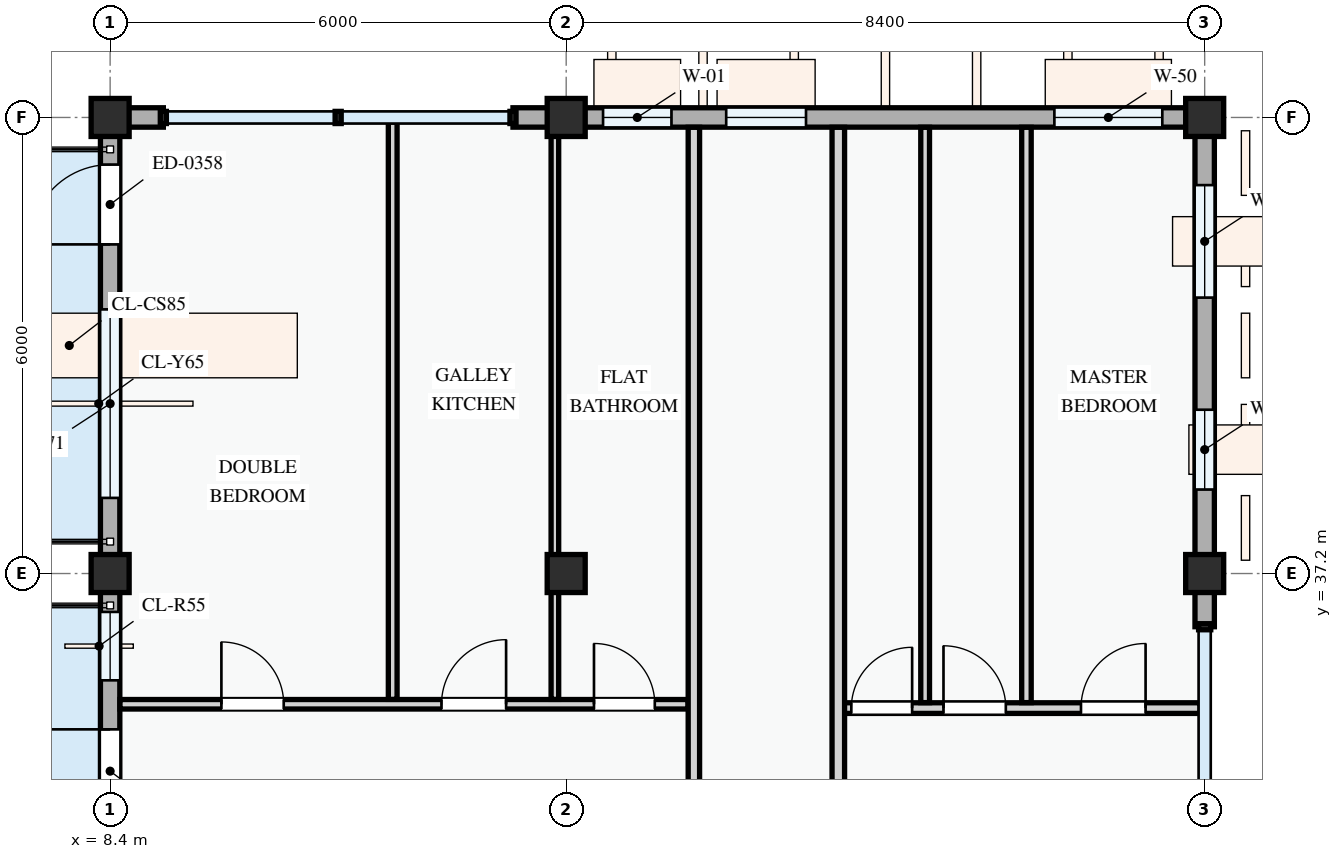
"""IFC4 building model, lengths in metres.
Left out: names, types, materials, properties, quantities, classifications, styles, units other than length and angle.
Written with IfcOpenShell. Run it as: python <this file> out.ifc"""

import sys

from ifc_helpers import new_model, si_unit, direction, frame, frame_2d, origin, origin_2d, place, context, subcontext, project, spatial, rectangle, extrude, element, fill, save


model = new_model("IFC4")
c1 = context("Model", 3, precision=1e-05, world=origin(), true_north=direction((0.0, 1.0)))
c2 = subcontext(c1, "Body", "Model", "MODEL_VIEW")
j1 = project(units=[si_unit("LENGTHUNIT", "METRE"), si_unit("PLANEANGLEUNIT", "RADIAN")], contexts=[c1])
p1 = place(None, origin())
s1 = spatial("IfcSite", under=j1, at=p1, CompositionType="ELEMENT")
p2 = place(p1, origin())
s2 = spatial("IfcBuilding", under=s1, at=p2, CompositionType="ELEMENT")
p3 = place(p2, frame((0.0, 0.0, 31.2)))
s3 = spatial("IfcBuildingStorey", under=s2, at=p3, CompositionType="ELEMENT", Elevation=31.2)
for number, where, z_axis, x_axis in (
    (1, (8.4, 37.2, 0.0), (0.0, 0.0, 1.0), (1.0, 0.0, 0.0)),
    (2, (8.4, 43.2, 0.0), (0.0, 0.0, 1.0), (1.0, 0.0, 0.0)),
    (3, (14.4, 37.2, 0.0), (0.0, 0.0, 1.0), (1.0, 0.0, 0.0)),
    (4, (14.4, 43.2, 0.0), (0.0, 0.0, 1.0), (1.0, 0.0, 0.0)),
    (5, (22.8, 37.2, 0.0), (0.0, 0.0, 1.0), (1.0, 0.0, 0.0)),
    (6, (22.8, 43.2, 0.0), (0.0, 0.0, 1.0), (1.0, 0.0, 0.0)),
):
    element("IfcColumn", number, at=place(p3, frame(where, z_axis=z_axis, x_axis=x_axis)), inside=s3, PredefinedType="COLUMN", context=c2, shape_type="SweptSolid", body=[
        extrude(rectangle(XDim=0.5, YDim=0.5, at=origin_2d()), origin(), (0.0, 0.0, 1.0), 3.3),
    ])
p4 = place(p3, frame((22.8, 36.5, 0.0), z_axis=(0.0, 0.0, 1.0), x_axis=(0.0, 1.0, 0.0)))
e7 = element("IfcWall", 7, at=p4, inside=s3, PredefinedType="STANDARD", context=c2, shape_type="SweptSolid", body=[
    extrude(rectangle(XDim=0.7, YDim=0.255, at=frame_2d((0.35, 0.0))), origin(), (0.0, 0.0, 1.0), 2.425),
])
p5 = place(p3, frame((22.8, 37.2, 0.0), z_axis=(0.0, 0.0, 1.0), x_axis=(0.0, 1.0, 0.0)))
e8 = element("IfcWall", 8, at=p5, inside=s3, PredefinedType="STANDARD", context=c2, shape_type="SweptSolid", body=[
    extrude(rectangle(XDim=6.0, YDim=0.255, at=frame_2d((3.0, 0.0))), origin(), (0.0, 0.0, 1.0), 2.575),
])
p6 = place(p5, frame((1.105, 0.0, 0.78)))
e9 = element("IfcOpeningElement", 9, at=p6, cuts=e8, PredefinedType="OPENING", context=c2, shape_type="SweptSolid", body=[
    extrude(rectangle(XDim=1.05, YDim=1.2, at=frame_2d((0.525, 0.6))), frame((0.0, 0.137, 0.0), z_axis=(0.0, -1.0, 0.0), x_axis=(1.0, 0.0, 0.0)), (0.0, 0.0, 1.0), 0.275),
])
p7 = place(p5, frame((3.63, 0.0, 0.78)))
e10 = element("IfcOpeningElement", 10, at=p7, cuts=e8, PredefinedType="OPENING", context=c2, shape_type="SweptSolid", body=[
    extrude(rectangle(XDim=1.48, YDim=1.52, at=frame_2d((0.74, 0.76))), frame((0.0, 0.137, 0.0), z_axis=(0.0, -1.0, 0.0), x_axis=(1.0, 0.0, 0.0)), (0.0, 0.0, 1.0), 0.275),
])
p8 = place(p3, frame((22.8, 43.2, 0.0), z_axis=(0.0, 0.0, 1.0), x_axis=(-1.0, 0.0, 0.0)))
e11 = element("IfcWall", 11, at=p8, inside=s3, PredefinedType="STANDARD", context=c2, shape_type="SweptSolid", body=[
    extrude(rectangle(XDim=8.4, YDim=0.255, at=frame_2d((4.2, 0.0))), origin(), (0.0, 0.0, 1.0), 2.375),
])
p9 = place(p8, frame((0.557, 0.0, 0.78)))
e12 = element("IfcOpeningElement", 12, at=p9, cuts=e11, PredefinedType="OPENING", context=c2, shape_type="SweptSolid", body=[
    extrude(rectangle(XDim=1.42, YDim=1.38, at=frame_2d((0.71, 0.69))), frame((0.0, 0.137, 0.0), z_axis=(0.0, -1.0, 0.0), x_axis=(1.0, 0.0, 0.0)), (0.0, 0.0, 1.0), 0.275),
])
p10 = place(p8, frame((5.245, 0.0, 0.78)))
e13 = element("IfcOpeningElement", 13, at=p10, cuts=e11, PredefinedType="OPENING", context=c2, shape_type="SweptSolid", body=[
    extrude(rectangle(XDim=1.05, YDim=1.2, at=frame_2d((0.525, 0.6))), frame((0.0, 0.137, 0.0), z_axis=(0.0, -1.0, 0.0), x_axis=(1.0, 0.0, 0.0)), (0.0, 0.0, 1.0), 0.275),
])
p11 = place(p8, frame((7.015, 0.0, 0.78)))
e14 = element("IfcOpeningElement", 14, at=p11, cuts=e11, PredefinedType="OPENING", context=c2, shape_type="SweptSolid", body=[
    extrude(rectangle(XDim=0.9, YDim=1.2, at=frame_2d((0.45, 0.6))), frame((0.0, 0.137, 0.0), z_axis=(0.0, -1.0, 0.0), x_axis=(1.0, 0.0, 0.0)), (0.0, 0.0, 1.0), 0.275),
])
p12 = place(p3, frame((14.4, 43.2, 0.0), z_axis=(0.0, 0.0, 1.0), x_axis=(-1.0, 0.0, 0.0)))
e15 = element("IfcWall", 15, at=p12, inside=s3, PredefinedType="STANDARD", context=c2, shape_type="SweptSolid", body=[
    extrude(rectangle(XDim=0.7, YDim=0.255, at=frame_2d((0.35, 0.0))), origin(), (0.0, 0.0, 1.0), 2.525),
])
p13 = place(p3, frame((9.1, 43.2, 0.0), z_axis=(0.0, 0.0, 1.0), x_axis=(-1.0, 0.0, 0.0)))
e16 = element("IfcWall", 16, at=p13, inside=s3, PredefinedType="STANDARD", context=c2, shape_type="SweptSolid", body=[
    extrude(rectangle(XDim=0.571, YDim=0.255, at=frame_2d((0.285, 0.0))), origin(), (0.0, 0.0, 1.0), 2.525),
])
p14 = place(p3, frame((8.4, 43.2, 0.0), z_axis=(0.0, 0.0, 1.0), x_axis=(0.0, -1.0, 0.0)))
e17 = element("IfcWall", 17, at=p14, inside=s3, PredefinedType="STANDARD", context=c2, shape_type="SweptSolid", body=[
    extrude(rectangle(XDim=6.0, YDim=0.255, at=frame_2d((3.0, 0.0))), origin(), (0.0, 0.0, 1.0), 2.575),
])
p15 = place(p14, frame((0.62, 0.0, 0.0)))
e18 = element("IfcOpeningElement", 18, at=p15, cuts=e17, PredefinedType="OPENING", context=c2, shape_type="SweptSolid", body=[
    extrude(rectangle(XDim=1.05, YDim=2.15, at=frame_2d((0.525, 1.075))), frame((0.0, 0.137, 0.0), z_axis=(0.0, -1.0, 0.0), x_axis=(1.0, 0.0, 0.0)), (0.0, 0.0, 1.0), 0.275),
])
p16 = place(p14, frame((2.525, 0.0, 0.78)))
e19 = element("IfcOpeningElement", 19, at=p16, cuts=e17, PredefinedType="OPENING", context=c2, shape_type="SweptSolid", body=[
    extrude(rectangle(XDim=2.48, YDim=1.46, at=frame_2d((1.24, 0.73))), frame((0.0, 0.137, 0.0), z_axis=(0.0, -1.0, 0.0), x_axis=(1.0, 0.0, 0.0)), (0.0, 0.0, 1.0), 0.275),
])
p17 = place(p3, frame((8.4, 37.2, 0.0), z_axis=(0.0, 0.0, 1.0), x_axis=(0.0, -1.0, 0.0)))
e20 = element("IfcWall", 20, at=p17, inside=s3, PredefinedType="STANDARD", context=c2, shape_type="SweptSolid", body=[
    extrude(rectangle(XDim=8.4, YDim=0.255, at=frame_2d((4.2, 0.0))), origin(), (0.0, 0.0, 1.0), 2.425),
])
p18 = place(p17, frame((2.05, 0.0, 0.0)))
e21 = element("IfcOpeningElement", 21, at=p18, cuts=e20, PredefinedType="OPENING", context=c2, shape_type="SweptSolid", body=[
    extrude(rectangle(XDim=1.1, YDim=2.15, at=frame_2d((0.55, 1.075))), frame((0.0, 0.137, 0.0), z_axis=(0.0, -1.0, 0.0), x_axis=(1.0, 0.0, 0.0)), (0.0, 0.0, 1.0), 0.275),
])
p19 = place(p17, frame((0.505, 0.0, 0.78)))
e22 = element("IfcOpeningElement", 22, at=p19, cuts=e20, PredefinedType="OPENING", context=c2, shape_type="SweptSolid", body=[
    extrude(rectangle(XDim=0.9, YDim=1.2, at=frame_2d((0.45, 0.6))), frame((0.0, 0.137, 0.0), z_axis=(0.0, -1.0, 0.0), x_axis=(1.0, 0.0, 0.0)), (0.0, 0.0, 1.0), 0.275),
])
p20 = place(p17, frame((3.63, 0.0, 0.78)))
e23 = element("IfcOpeningElement", 23, at=p20, cuts=e20, PredefinedType="OPENING", context=c2, shape_type="SweptSolid", body=[
    extrude(rectangle(XDim=2.52, YDim=1.5, at=frame_2d((1.26, 0.75))), frame((0.0, 0.137, 0.0), z_axis=(0.0, -1.0, 0.0), x_axis=(1.0, 0.0, 0.0)), (0.0, 0.0, 1.0), 0.275),
])
p21 = place(p17, frame((6.945, 0.0, 0.78)))
e24 = element("IfcOpeningElement", 24, at=p21, cuts=e20, PredefinedType="OPENING", context=c2, shape_type="SweptSolid", body=[
    extrude(rectangle(XDim=0.9, YDim=1.2, at=frame_2d((0.45, 0.6))), frame((0.0, 0.137, 0.0), z_axis=(0.0, -1.0, 0.0), x_axis=(1.0, 0.0, 0.0)), (0.0, 0.0, 1.0), 0.275),
])
p22 = place(p3, frame((8.53, 35.48, 0.0), z_axis=(0.0, 0.0, 1.0), x_axis=(1.0, 0.0, 0.0)))
e25 = element("IfcWall", 25, at=p22, inside=s3, PredefinedType="PARTITIONING", context=c2, shape_type="SweptSolid", body=[
    extrude(rectangle(XDim=7.473, YDim=0.125, at=frame_2d((3.737, 0.0))), origin(), (0.0, 0.0, 1.0), 3.0),
])
p23 = place(p22, frame((1.334, 0.0, 0.0)))
e26 = element("IfcOpeningElement", 26, at=p23, cuts=e25, PredefinedType="OPENING", context=c2, shape_type="SweptSolid", body=[
    extrude(rectangle(XDim=0.82, YDim=2.08, at=frame_2d((0.41, 1.04))), frame((0.0, 0.073, 0.0), z_axis=(0.0, -1.0, 0.0), x_axis=(1.0, 0.0, 0.0)), (0.0, 0.0, 1.0), 0.145),
])
p24 = place(p22, frame((4.23, 0.0, 0.0)))
e27 = element("IfcOpeningElement", 27, at=p24, cuts=e25, PredefinedType="OPENING", context=c2, shape_type="SweptSolid", body=[
    extrude(rectangle(XDim=0.85, YDim=2.1, at=frame_2d((0.425, 1.05))), frame((0.0, 0.073, 0.0), z_axis=(0.0, -1.0, 0.0), x_axis=(1.0, 0.0, 0.0)), (0.0, 0.0, 1.0), 0.145),
])
p25 = place(p22, frame((6.236, 0.0, 0.0)))
e28 = element("IfcOpeningElement", 28, at=p25, cuts=e25, PredefinedType="OPENING", context=c2, shape_type="SweptSolid", body=[
    extrude(rectangle(XDim=0.8, YDim=2.1, at=frame_2d((0.4, 1.05))), frame((0.0, 0.073, 0.0), z_axis=(0.0, -1.0, 0.0), x_axis=(1.0, 0.0, 0.0)), (0.0, 0.0, 1.0), 0.145),
])
p26 = place(p3, frame((12.118, 35.544, 0.0), z_axis=(0.0, 0.0, 1.0), x_axis=(0.0, 1.0, 0.0)))
e29 = element("IfcWall", 29, at=p26, inside=s3, PredefinedType="PARTITIONING", context=c2, shape_type="SweptSolid", body=[
    extrude(rectangle(XDim=7.595, YDim=0.115, at=frame_2d((3.798, 0.0))), origin(), (0.0, 0.0, 1.0), 3.0),
])
p27 = place(p3, frame((14.251, 35.544, 0.0), z_axis=(0.0, 0.0, 1.0), x_axis=(0.0, 1.0, 0.0)))
e30 = element("IfcWall", 30, at=p27, inside=s3, PredefinedType="PARTITIONING", context=c2, shape_type="SweptSolid", body=[
    extrude(rectangle(XDim=7.526, YDim=0.1, at=frame_2d((3.763, 0.0))), origin(), (0.0, 0.0, 1.0), 2.425),
])
p28 = place(p3, frame((17.98, 35.43, 0.0), z_axis=(0.0, 0.0, 1.0), x_axis=(1.0, 0.0, 0.0)))
e31 = element("IfcWall", 31, at=p28, inside=s3, PredefinedType="PARTITIONING", context=c2, shape_type="SweptSolid", body=[
    extrude(rectangle(XDim=4.76, YDim=0.14, at=frame_2d((2.38, 0.0))), origin(), (0.0, 0.0, 1.0), 3.0),
])
p29 = place(p28, frame((0.171, 0.0, 0.0)))
e32 = element("IfcOpeningElement", 32, at=p29, cuts=e31, PredefinedType="OPENING", context=c2, shape_type="SweptSolid", body=[
    extrude(rectangle(XDim=0.8, YDim=2.1, at=frame_2d((0.4, 1.05))), frame((0.0, 0.08, 0.0), z_axis=(0.0, -1.0, 0.0), x_axis=(1.0, 0.0, 0.0)), (0.0, 0.0, 1.0), 0.16),
])
p30 = place(p28, frame((1.384, 0.0, 0.0)))
e33 = element("IfcOpeningElement", 33, at=p30, cuts=e31, PredefinedType="OPENING", context=c2, shape_type="SweptSolid", body=[
    extrude(rectangle(XDim=0.82, YDim=2.08, at=frame_2d((0.41, 1.04))), frame((0.0, 0.08, 0.0), z_axis=(0.0, -1.0, 0.0), x_axis=(1.0, 0.0, 0.0)), (0.0, 0.0, 1.0), 0.16),
])
p31 = place(p28, frame((3.193, 0.0, 0.0)))
e34 = element("IfcOpeningElement", 34, at=p31, cuts=e31, PredefinedType="OPENING", context=c2, shape_type="SweptSolid", body=[
    extrude(rectangle(XDim=0.85, YDim=2.1, at=frame_2d((0.425, 1.05))), frame((0.0, 0.08, 0.0), z_axis=(0.0, -1.0, 0.0), x_axis=(1.0, 0.0, 0.0)), (0.0, 0.0, 1.0), 0.16),
])
p32 = place(p3, frame((20.455, 35.502, 0.0), z_axis=(0.0, 0.0, 1.0), x_axis=(0.0, 1.0, 0.0)))
e35 = element("IfcWall", 35, at=p32, inside=s3, PredefinedType="PARTITIONING", context=c2, shape_type="SweptSolid", body=[
    extrude(rectangle(XDim=7.569, YDim=0.125, at=frame_2d((3.784, 0.0))), origin(), (0.0, 0.0, 1.0), 3.0),
])
p33 = place(p3, frame((19.122, 35.502, 0.0), z_axis=(0.0, 0.0, 1.0), x_axis=(0.0, 1.0, 0.0)))
e36 = element("IfcWall", 36, at=p33, inside=s3, PredefinedType="PARTITIONING", context=c2, shape_type="SweptSolid", body=[
    extrude(rectangle(XDim=7.569, YDim=0.115, at=frame_2d((3.784, 0.0))), origin(), (0.0, 0.0, 1.0), 3.0),
])
p34 = place(p3, frame((16.08, 22.66, 0.0), z_axis=(0.0, 0.0, 1.0), x_axis=(0.0, 1.0, 0.0)))
e37 = element("IfcWall", 37, at=p34, inside=s3, PredefinedType="PARTITIONING", context=c2, shape_type="SweptSolid", body=[
    extrude(rectangle(XDim=20.411, YDim=0.15, at=frame_2d((10.205, 0.0))), origin(), (0.0, 0.0, 1.0), 3.0),
])
p35 = place(p34, frame((2.691, 0.0, 0.0)))
e38 = element("IfcOpeningElement", 38, at=p35, cuts=e37, PredefinedType="OPENING", context=c2, shape_type="SweptSolid", body=[
    extrude(rectangle(XDim=0.92, YDim=2.1, at=frame_2d((0.46, 1.05))), frame((0.0, 0.085, 0.0), z_axis=(0.0, -1.0, 0.0), x_axis=(1.0, 0.0, 0.0)), (0.0, 0.0, 1.0), 0.17),
])
p36 = place(p34, frame((9.91, 0.0, 0.0)))
e39 = element("IfcOpeningElement", 39, at=p36, cuts=e37, PredefinedType="OPENING", context=c2, shape_type="SweptSolid", body=[
    extrude(rectangle(XDim=0.96, YDim=2.12, at=frame_2d((0.48, 1.06))), frame((0.0, 0.085, 0.0), z_axis=(0.0, -1.0, 0.0), x_axis=(1.0, 0.0, 0.0)), (0.0, 0.0, 1.0), 0.17),
])
p37 = place(p3, frame((17.98, 22.66, 0.0), z_axis=(0.0, 0.0, 1.0), x_axis=(0.0, 1.0, 0.0)))
e40 = element("IfcWall", 40, at=p37, inside=s3, PredefinedType="PARTITIONING", context=c2, shape_type="SweptSolid", body=[
    extrude(rectangle(XDim=20.411, YDim=0.165, at=frame_2d((10.205, 0.0))), origin(), (0.0, 0.0, 1.0), 3.0),
])
p38 = place(p37, frame((2.611, 0.0, 0.0)))
e41 = element("IfcOpeningElement", 41, at=p38, cuts=e40, PredefinedType="OPENING", context=c2, shape_type="SweptSolid", body=[
    extrude(rectangle(XDim=0.92, YDim=2.1, at=frame_2d((0.46, 1.05))), frame((0.0, 0.093, 0.0), z_axis=(0.0, -1.0, 0.0), x_axis=(1.0, 0.0, 0.0)), (0.0, 0.0, 1.0), 0.185),
])
p39 = place(p37, frame((9.885, 0.0, 0.0)))
e42 = element("IfcOpeningElement", 42, at=p39, cuts=e40, PredefinedType="OPENING", context=c2, shape_type="SweptSolid", body=[
    extrude(rectangle(XDim=0.92, YDim=2.1, at=frame_2d((0.46, 1.05))), frame((0.0, 0.093, 0.0), z_axis=(0.0, -1.0, 0.0), x_axis=(1.0, 0.0, 0.0)), (0.0, 0.0, 1.0), 0.185),
])
p40 = place(p6, origin())
e43 = element("IfcWindow", 43, at=p40, inside=s3, PartitioningType="SINGLE_PANEL", PredefinedType="WINDOW", context=c2, shape_type="SweptSolid", body=[
    extrude(rectangle(XDim=1.05, YDim=1.2, at=frame_2d((0.525, 0.6))), frame((0.0, 0.03, 0.0), z_axis=(0.0, -1.0, 0.0), x_axis=(1.0, 0.0, 0.0)), (0.0, 0.0, 1.0), 0.06),
])
fill(e9, e43)
p41 = place(p7, origin())
e44 = element("IfcWindow", 44, at=p41, inside=s3, PartitioningType="SINGLE_PANEL", PredefinedType="WINDOW", context=c2, shape_type="SweptSolid", body=[
    extrude(rectangle(XDim=1.48, YDim=1.52, at=frame_2d((0.74, 0.76))), frame((0.0, 0.03, 0.0), z_axis=(0.0, -1.0, 0.0), x_axis=(1.0, 0.0, 0.0)), (0.0, 0.0, 1.0), 0.06),
])
fill(e10, e44)
p42 = place(p9, origin())
e45 = element("IfcWindow", 45, at=p42, inside=s3, PartitioningType="SINGLE_PANEL", PredefinedType="WINDOW", context=c2, shape_type="SweptSolid", body=[
    extrude(rectangle(XDim=1.42, YDim=1.38, at=frame_2d((0.71, 0.69))), frame((0.0, 0.03, 0.0), z_axis=(0.0, -1.0, 0.0), x_axis=(1.0, 0.0, 0.0)), (0.0, 0.0, 1.0), 0.06),
])
fill(e12, e45)
p43 = place(p10, origin())
e46 = element("IfcWindow", 46, at=p43, inside=s3, PartitioningType="SINGLE_PANEL", PredefinedType="WINDOW", context=c2, shape_type="SweptSolid", body=[
    extrude(rectangle(XDim=1.05, YDim=1.2, at=frame_2d((0.525, 0.6))), frame((0.0, 0.03, 0.0), z_axis=(0.0, -1.0, 0.0), x_axis=(1.0, 0.0, 0.0)), (0.0, 0.0, 1.0), 0.06),
])
fill(e13, e46)
p44 = place(p11, origin())
e47 = element("IfcWindow", 47, at=p44, inside=s3, PartitioningType="SINGLE_PANEL", PredefinedType="WINDOW", context=c2, shape_type="SweptSolid", body=[
    extrude(rectangle(XDim=0.9, YDim=1.2, at=frame_2d((0.45, 0.6))), frame((0.0, 0.03, 0.0), z_axis=(0.0, -1.0, 0.0), x_axis=(1.0, 0.0, 0.0)), (0.0, 0.0, 1.0), 0.06),
])
fill(e14, e47)
p45 = place(p15, frame((1.05, 0.0, 0.0), z_axis=(0.0, 0.0, 1.0), x_axis=(-1.0, 0.0, 0.0)))
e48 = element("IfcDoor", 48, at=p45, inside=s3, OperationType="SINGLE_SWING_LEFT", PredefinedType="DOOR", context=c2, shape_type="SweptSolid", body=[
    extrude(rectangle(XDim=1.05, YDim=2.15, at=frame_2d((0.525, 1.075))), frame((0.0, 0.025, 0.0), z_axis=(0.0, -1.0, 0.0), x_axis=(1.0, 0.0, 0.0)), (0.0, 0.0, 1.0), 0.05),
])
fill(e18, e48)
p46 = place(p16, origin())
e49 = element("IfcWindow", 49, at=p46, inside=s3, PartitioningType="DOUBLE_PANEL_VERTICAL", PredefinedType="WINDOW", context=c2, shape_type="SweptSolid", body=[
    extrude(rectangle(XDim=2.48, YDim=1.46, at=frame_2d((1.24, 0.73))), frame((0.0, 0.03, 0.0), z_axis=(0.0, -1.0, 0.0), x_axis=(1.0, 0.0, 0.0)), (0.0, 0.0, 1.0), 0.06),
])
fill(e19, e49)
p47 = place(p18, frame((1.1, 0.0, 0.0), z_axis=(0.0, 0.0, 1.0), x_axis=(-1.0, 0.0, 0.0)))
e50 = element("IfcDoor", 50, at=p47, inside=s3, OperationType="SINGLE_SWING_RIGHT", PredefinedType="DOOR", context=c2, shape_type="SweptSolid", body=[
    extrude(rectangle(XDim=1.1, YDim=2.15, at=frame_2d((0.55, 1.075))), frame((0.0, 0.025, 0.0), z_axis=(0.0, -1.0, 0.0), x_axis=(1.0, 0.0, 0.0)), (0.0, 0.0, 1.0), 0.05),
])
fill(e21, e50)
p48 = place(p19, origin())
e51 = element("IfcWindow", 51, at=p48, inside=s3, PartitioningType="SINGLE_PANEL", PredefinedType="WINDOW", context=c2, shape_type="SweptSolid", body=[
    extrude(rectangle(XDim=0.9, YDim=1.2, at=frame_2d((0.45, 0.6))), frame((0.0, 0.03, 0.0), z_axis=(0.0, -1.0, 0.0), x_axis=(1.0, 0.0, 0.0)), (0.0, 0.0, 1.0), 0.06),
])
fill(e22, e51)
p49 = place(p23, origin())
e52 = element("IfcDoor", 52, at=p49, inside=s3, OperationType="SINGLE_SWING_LEFT", PredefinedType="DOOR", context=c2, shape_type="SweptSolid", body=[
    extrude(rectangle(XDim=0.82, YDim=2.08, at=frame_2d((0.41, 1.04))), frame((0.0, 0.025, 0.0), z_axis=(0.0, -1.0, 0.0), x_axis=(1.0, 0.0, 0.0)), (0.0, 0.0, 1.0), 0.05),
])
fill(e26, e52)
p50 = place(p24, origin())
e53 = element("IfcDoor", 53, at=p50, inside=s3, OperationType="SINGLE_SWING_RIGHT", PredefinedType="DOOR", context=c2, shape_type="SweptSolid", body=[
    extrude(rectangle(XDim=0.85, YDim=2.1, at=frame_2d((0.425, 1.05))), frame((0.0, 0.025, 0.0), z_axis=(0.0, -1.0, 0.0), x_axis=(1.0, 0.0, 0.0)), (0.0, 0.0, 1.0), 0.05),
])
fill(e27, e53)
p51 = place(p25, origin())
e54 = element("IfcDoor", 54, at=p51, inside=s3, OperationType="SINGLE_SWING_LEFT", PredefinedType="DOOR", context=c2, shape_type="SweptSolid", body=[
    extrude(rectangle(XDim=0.8, YDim=2.1, at=frame_2d((0.4, 1.05))), frame((0.0, 0.025, 0.0), z_axis=(0.0, -1.0, 0.0), x_axis=(1.0, 0.0, 0.0)), (0.0, 0.0, 1.0), 0.05),
])
fill(e28, e54)
p52 = place(p29, origin())
e55 = element("IfcDoor", 55, at=p52, inside=s3, OperationType="SINGLE_SWING_RIGHT", PredefinedType="DOOR", context=c2, shape_type="SweptSolid", body=[
    extrude(rectangle(XDim=0.8, YDim=2.1, at=frame_2d((0.4, 1.05))), frame((0.0, 0.025, 0.0), z_axis=(0.0, -1.0, 0.0), x_axis=(1.0, 0.0, 0.0)), (0.0, 0.0, 1.0), 0.05),
])
fill(e32, e55)
p53 = place(p30, origin())
e56 = element("IfcDoor", 56, at=p53, inside=s3, OperationType="SINGLE_SWING_LEFT", PredefinedType="DOOR", context=c2, shape_type="SweptSolid", body=[
    extrude(rectangle(XDim=0.82, YDim=2.08, at=frame_2d((0.41, 1.04))), frame((0.0, 0.025, 0.0), z_axis=(0.0, -1.0, 0.0), x_axis=(1.0, 0.0, 0.0)), (0.0, 0.0, 1.0), 0.05),
])
fill(e33, e56)
p54 = place(p31, origin())
e57 = element("IfcDoor", 57, at=p54, inside=s3, OperationType="SINGLE_SWING_RIGHT", PredefinedType="DOOR", context=c2, shape_type="SweptSolid", body=[
    extrude(rectangle(XDim=0.85, YDim=2.1, at=frame_2d((0.425, 1.05))), frame((0.0, 0.025, 0.0), z_axis=(0.0, -1.0, 0.0), x_axis=(1.0, 0.0, 0.0)), (0.0, 0.0, 1.0), 0.05),
])
fill(e34, e57)
save(model, sys.argv[1])
